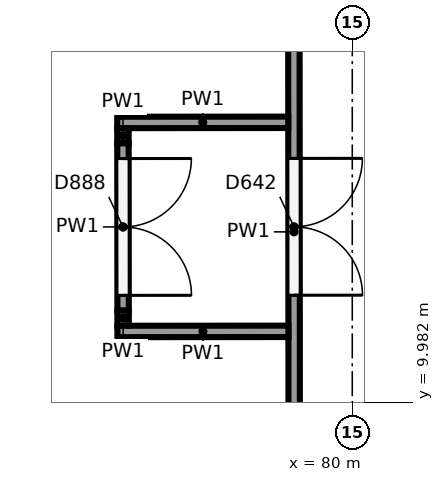
"""IFC4 building model, lengths in metres.
Left out: names, types, materials, properties, quantities, classifications, styles, units other than length and angle.
Written with IfcOpenShell. Run it as: python <this file> out.ifc"""

import sys

from ifc_helpers import new_model, si_unit, direction, frame, frame_2d, origin, place, context, subcontext, project, spatial, rectangle, extrude, element, fill, save


model = new_model("IFC4")
c1 = context("Model", 3, precision=1e-05, world=origin(), true_north=direction((0.0, 1.0)))
c2 = subcontext(c1, "Body", "Model", "MODEL_VIEW")
j1 = project(units=[si_unit("LENGTHUNIT", "METRE"), si_unit("PLANEANGLEUNIT", "RADIAN")], contexts=[c1])
p1 = place(None, origin())
s1 = spatial("IfcSite", under=j1, at=p1, CompositionType="ELEMENT")
p2 = place(p1, origin())
s2 = spatial("IfcBuilding", under=s1, at=p2, CompositionType="ELEMENT")
p3 = place(p2, frame((0.0, 0.0, 6.5)))
s3 = spatial("IfcBuildingStorey", under=s2, at=p3, CompositionType="ELEMENT", Elevation=6.5)
p4 = place(p3, frame((79.23, 17.64, 0.0), z_axis=(0.0, 0.0, 1.0), x_axis=(0.0007662833, -0.999999706405, 0.0)))
e1 = element("IfcWall", 1, at=p4, inside=s3, PredefinedType="PARTITIONING", context=c2, shape_type="SweptSolid", body=[
    extrude(rectangle(XDim=10.833, YDim=0.15, at=frame_2d((5.416, 0.0))), origin(), (0.0, 0.0, 1.0), 5.15),
])
p5 = place(p4, frame((4.45, 0.0, 0.0)))
e2 = element("IfcOpeningElement", 2, at=p5, cuts=e1, PredefinedType="OPENING", context=c2, shape_type="SweptSolid", body=[
    extrude(rectangle(XDim=1.8, YDim=2.1, at=frame_2d((0.9, 1.05))), frame((0.0, 0.085, 0.0), z_axis=(0.0, -1.0, 0.0), x_axis=(1.0, 0.0, 0.0)), (0.0, 0.0, 1.0), 0.17),
])
for number, where, z_axis, x_axis in (
    (3, (79.158, 13.665, 0.0), (0.0, 0.0, 1.0), (-1.0, -0.001, 0.0)),
    (4, (79.16, 10.915, 0.0), (0.0, 0.0, 1.0), (-1.0, -0.001, 0.0)),
):
    element("IfcWall", number, at=place(p3, frame(where, z_axis=z_axis, x_axis=x_axis)), inside=s3, PredefinedType="PARTITIONING", context=c2, shape_type="SweptSolid", body=[
        extrude(rectangle(XDim=2.25, YDim=0.15, at=frame_2d((1.125, 0.0))), origin(), (0.0, 0.0, 1.0), 5.15),
    ])
p6 = place(p3, frame((76.983, 13.588, 0.0), z_axis=(0.0, 0.0, 1.0), x_axis=(0.0, -1.0, 0.0)))
e5 = element("IfcWall", 5, at=p6, inside=s3, PredefinedType="PARTITIONING", context=c2, shape_type="SweptSolid", body=[
    extrude(rectangle(XDim=0.2, YDim=0.15, at=frame_2d((0.1, 0.0))), origin(), (0.0, 0.0, 1.0), 5.15),
])
p7 = place(p3, frame((76.983, 13.388, 0.0), z_axis=(0.0, 0.0, 1.0), x_axis=(0.000776828087, -0.999999698269, 0.0)))
e6 = element("IfcWall", 6, at=p7, inside=s3, PredefinedType="PARTITIONING", context=c2, shape_type="SweptSolid", body=[
    extrude(rectangle(XDim=2.2, YDim=0.15, at=frame_2d((1.1, 0.0))), origin(), (0.0, 0.0, 1.0), 5.15),
])
p8 = place(p7, frame((0.2, 0.0, 0.0)))
e7 = element("IfcOpeningElement", 7, at=p8, cuts=e6, PredefinedType="OPENING", context=c2, shape_type="SweptSolid", body=[
    extrude(rectangle(XDim=1.8, YDim=2.1, at=frame_2d((0.9, 1.05))), frame((0.0, 0.085, 0.0), z_axis=(0.0, -1.0, 0.0), x_axis=(1.0, 0.0, 0.0)), (0.0, 0.0, 1.0), 0.17),
])
p9 = place(p3, frame((76.985, 11.188, 0.0), z_axis=(0.0, 0.0, 1.0), x_axis=(0.001221000311, -0.999999254579, 0.0)))
e8 = element("IfcWall", 8, at=p9, inside=s3, PredefinedType="PARTITIONING", context=c2, shape_type="SweptSolid", body=[
    extrude(rectangle(XDim=0.2, YDim=0.15, at=frame_2d((0.1, 0.0))), origin(), (0.0, 0.0, 1.0), 5.15),
])
p10 = place(p5, origin())
e9 = element("IfcDoor", 9, at=p10, inside=s3, OperationType="DOUBLE_DOOR_SINGLE_SWING", PredefinedType="DOOR", context=c2, shape_type="SweptSolid", body=[
    extrude(rectangle(XDim=1.8, YDim=2.1, at=frame_2d((0.9, 1.05))), frame((0.0, 0.025, 0.0), z_axis=(0.0, -1.0, 0.0), x_axis=(1.0, 0.0, 0.0)), (0.0, 0.0, 1.0), 0.05),
])
fill(e2, e9)
p11 = place(p8, origin())
e10 = element("IfcDoor", 10, at=p11, inside=s3, OperationType="DOUBLE_DOOR_SINGLE_SWING", PredefinedType="DOOR", context=c2, shape_type="SweptSolid", body=[
    extrude(rectangle(XDim=1.8, YDim=2.1, at=frame_2d((0.9, 1.05))), frame((0.0, 0.025, 0.0), z_axis=(0.0, -1.0, 0.0), x_axis=(1.0, 0.0, 0.0)), (0.0, 0.0, 1.0), 0.05),
])
fill(e7, e10)
save(model, sys.argv[1])
